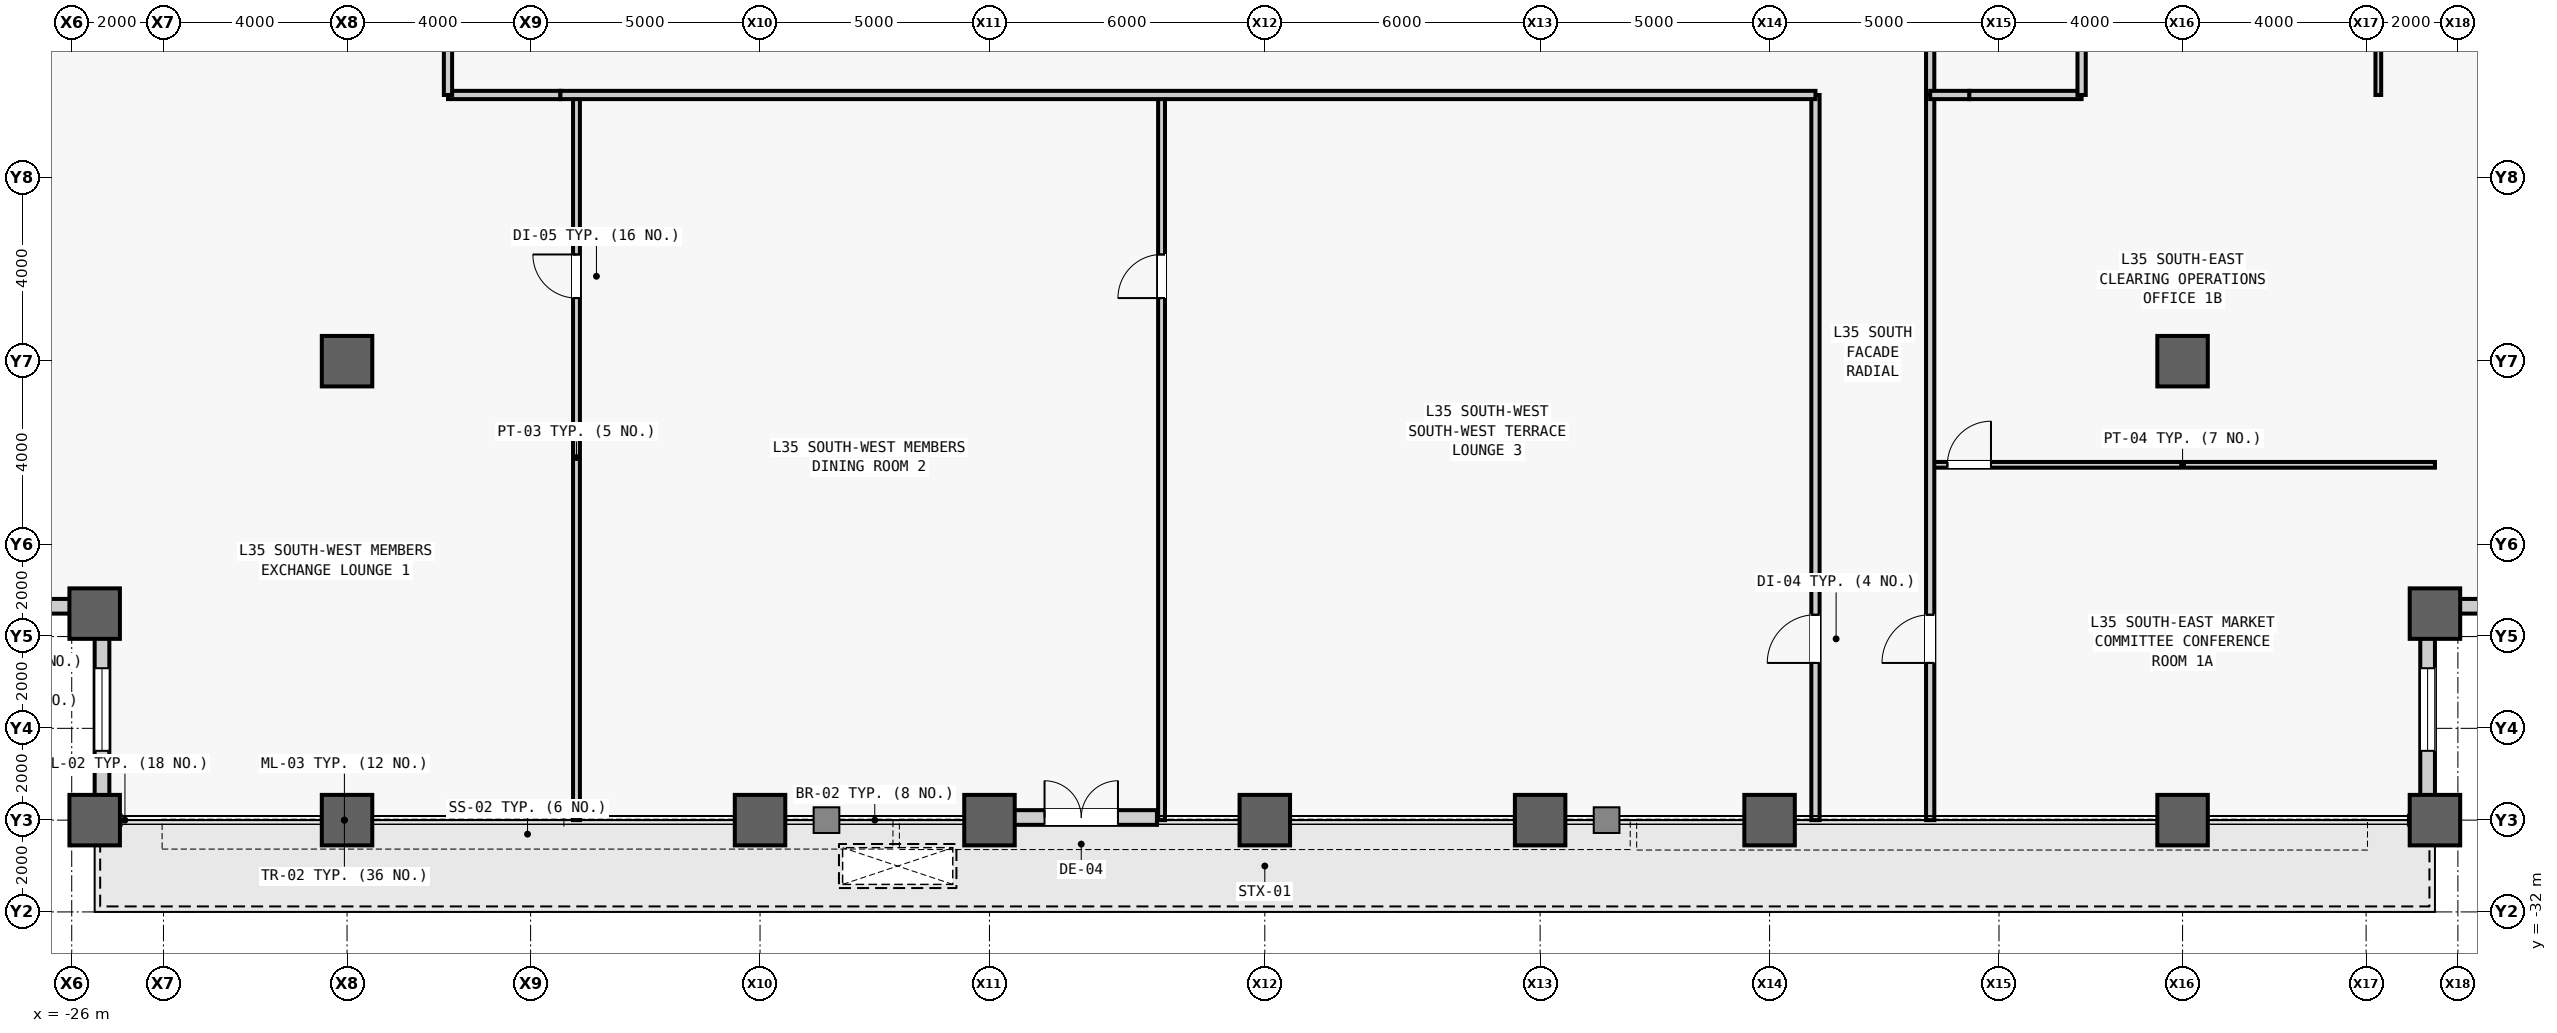
"""IFC4 building model, lengths in metres.
Left out: names, types, materials, properties, quantities, classifications, styles, units other than length and angle.
Written with IfcOpenShell. Run it as: python <this file> out.ifc"""

import sys

from ifc_helpers import new_model, si_unit, direction, frame, frame_2d, origin, origin_2d, place, context, subcontext, project, spatial, rectangle, hollow_rectangle, extrude, source, transform, mapped, element, fill, save


model = new_model("IFC4")
c1 = context("Model", 3, precision=1e-05, world=origin(), true_north=direction((0.0, 1.0)))
c2 = subcontext(c1, "Body", "Model", "MODEL_VIEW")
j1 = project(units=[si_unit("LENGTHUNIT", "METRE"), si_unit("PLANEANGLEUNIT", "RADIAN")], contexts=[c1])
p1 = place(None, origin())
s1 = spatial("IfcSite", under=j1, at=p1, CompositionType="ELEMENT")
p2 = place(p1, origin())
s2 = spatial("IfcBuilding", under=s1, at=p2, CompositionType="ELEMENT")
p3 = place(p2, frame((0.0, 0.0, 155.1)))
s3 = spatial("IfcBuildingStorey", under=s2, at=p3, CompositionType="ELEMENT", Elevation=155.1)
m1 = source(origin(), c2, "Body", "SweptSolid", [
    extrude(hollow_rectangle(XDim=1.1, YDim=1.1, WallThickness=0.06, at=origin_2d()), origin(), (0.0, 0.0, 1.0), 4.0),
])
for number, where, z_axis, x_axis in (
    (1, (-25.5, -30.0, 0.0), (0.0, 0.0, 1.0), (1.0, 0.0, 0.0)),
    (2, (-25.5, -25.5, 0.0), (0.0, 0.0, 1.0), (1.0, 0.0, 0.0)),
    (3, (-20.0, -30.0, 0.0), (0.0, 0.0, 1.0), (1.0, 0.0, 0.0)),
    (4, (-20.0, -20.0, 0.0), (0.0, 0.0, 1.0), (1.0, 0.0, 0.0)),
    (5, (-11.0, -30.0, 0.0), (0.0, 0.0, 1.0), (1.0, 0.0, 0.0)),
    (6, (-6.0, -30.0, 0.0), (0.0, 0.0, 1.0), (1.0, 0.0, 0.0)),
    (7, (0.0, -30.0, 0.0), (0.0, 0.0, 1.0), (1.0, 0.0, 0.0)),
    (8, (6.0, -30.0, 0.0), (0.0, 0.0, 1.0), (1.0, 0.0, 0.0)),
    (9, (11.0, -30.0, 0.0), (0.0, 0.0, 1.0), (1.0, 0.0, 0.0)),
    (10, (20.0, -30.0, 0.0), (0.0, 0.0, 1.0), (1.0, 0.0, 0.0)),
    (11, (20.0, -20.0, 0.0), (0.0, 0.0, 1.0), (1.0, 0.0, 0.0)),
    (12, (25.5, -30.0, 0.0), (0.0, 0.0, 1.0), (1.0, 0.0, 0.0)),
    (13, (25.5, -25.5, 0.0), (0.0, 0.0, 1.0), (1.0, 0.0, 0.0)),
):
    element("IfcColumn", number, at=place(p3, frame(where, z_axis=z_axis, x_axis=x_axis)), inside=s3, PredefinedType="COLUMN", context=c2, shape_type="MappedRepresentation", body=[
        mapped(m1, transform((0.0, 0.0, 0.0), scale=1.0)),
    ])
m2 = source(origin(), c2, "Body", "SweptSolid", [
    extrude(rectangle(XDim=4.18, YDim=0.32, at=frame_2d((2.09, 0.0))), origin(), (0.0, 0.0, 1.0), 3.164),
])
p4 = place(p3, frame((-25.5, -25.34, 0.0), z_axis=(0.0, 0.0, 1.0), x_axis=(-1.0, 0.0, 0.0)))
e14 = element("IfcWall", 14, at=p4, inside=s3, PredefinedType="STANDARD", context=c2, shape_type="MappedRepresentation", body=[
    mapped(m2, transform((0.0, 0.0, 0.0), scale=1.0)),
])
m3 = source(origin(), c2, "Body", "SweptSolid", [
    extrude(rectangle(XDim=1.8, YDim=2.4, at=frame_2d((0.9, 1.2))), frame((0.0, 0.17, 0.0), z_axis=(0.0, -1.0, 0.0), x_axis=(1.0, 0.0, 0.0)), (0.0, 0.0, 1.0), 0.34),
])
p5 = place(p4, frame((1.19, 0.0, 0.5)))
e15 = element("IfcOpeningElement", 15, at=p5, cuts=e14, PredefinedType="OPENING", context=c2, shape_type="MappedRepresentation", body=[
    mapped(m3, transform((0.0, 0.0, 0.0), scale=1.0)),
])
p6 = place(p3, frame((-25.34, -29.68, 0.0), z_axis=(0.0, 0.0, 1.0), x_axis=(0.0, 1.0, 0.0)))
e16 = element("IfcWall", 16, at=p6, inside=s3, PredefinedType="STANDARD", context=c2, shape_type="MappedRepresentation", body=[
    mapped(m2, transform((0.0, 0.0, 0.0), scale=1.0)),
])
p7 = place(p6, frame((1.19, 0.0, 0.5)))
e17 = element("IfcOpeningElement", 17, at=p7, cuts=e16, PredefinedType="OPENING", context=c2, shape_type="MappedRepresentation", body=[
    mapped(m3, transform((0.0, 0.0, 0.0), scale=1.0)),
])
p8 = place(p3, frame((25.34, -29.68, 0.0), z_axis=(0.0, 0.0, 1.0), x_axis=(0.0, 1.0, 0.0)))
e18 = element("IfcWall", 18, at=p8, inside=s3, PredefinedType="STANDARD", context=c2, shape_type="MappedRepresentation", body=[
    mapped(m2, transform((0.0, 0.0, 0.0), scale=1.0)),
])
p9 = place(p8, frame((1.19, 0.0, 0.5)))
e19 = element("IfcOpeningElement", 19, at=p9, cuts=e18, PredefinedType="OPENING", context=c2, shape_type="MappedRepresentation", body=[
    mapped(m3, transform((0.0, 0.0, 0.0), scale=1.0)),
])
p10 = place(p3, frame((25.5, -25.34, 0.0), z_axis=(0.0, 0.0, 1.0), x_axis=(1.0, 0.0, 0.0)))
e20 = element("IfcWall", 20, at=p10, inside=s3, PredefinedType="STANDARD", context=c2, shape_type="MappedRepresentation", body=[
    mapped(m2, transform((0.0, 0.0, 0.0), scale=1.0)),
])
p11 = place(p10, frame((1.19, 0.0, 0.5)))
e21 = element("IfcOpeningElement", 21, at=p11, cuts=e20, PredefinedType="OPENING", context=c2, shape_type="MappedRepresentation", body=[
    mapped(m3, transform((0.0, 0.0, 0.0), scale=1.0)),
])
m4 = source(origin(), c2, "Body", "SweptSolid", [
    extrude(rectangle(XDim=3.3, YDim=0.32, at=frame_2d((1.65, 0.0))), origin(), (0.0, 0.0, 1.0), 3.164),
])
p12 = place(p3, frame((-5.65, -29.942, 0.0), z_axis=(0.0, 0.0, 1.0), x_axis=(1.0, 0.0, 0.0)))
e22 = element("IfcWall", 22, at=p12, inside=s3, PredefinedType="STANDARD", context=c2, shape_type="MappedRepresentation", body=[
    mapped(m4, transform((0.0, 0.0, 0.0), scale=1.0)),
])
m5 = source(origin(), c2, "Body", "SweptSolid", [
    extrude(rectangle(XDim=1.6, YDim=2.25, at=frame_2d((0.8, 1.125))), frame((0.0, 0.17, 0.0), z_axis=(0.0, -1.0, 0.0), x_axis=(1.0, 0.0, 0.0)), (0.0, 0.0, 1.0), 0.34),
])
p13 = place(p12, frame((0.85, 0.0, 0.0)))
e23 = element("IfcOpeningElement", 23, at=p13, cuts=e22, PredefinedType="OPENING", context=c2, shape_type="MappedRepresentation", body=[
    mapped(m5, transform((0.0, 0.0, 0.0), scale=1.0)),
])
m6 = source(origin(), c2, "Body", "SweptSolid", [
    extrude(rectangle(XDim=2.45, YDim=0.18, at=frame_2d((1.225, 0.0))), origin(), (0.0, 0.0, 1.0), 3.78),
])
for number, where, z_axis, x_axis in (
    (24, (15.35, -14.2, 0.0), (0.0, 0.0, 1.0), (1.0, 0.0, 0.0)),
    (25, (-17.8, -14.2, 0.0), (0.0, 0.0, 1.0), (1.0, 0.0, 0.0)),
):
    element("IfcWall", number, at=place(p3, frame(where, z_axis=z_axis, x_axis=x_axis)), inside=s3, PredefinedType="PARTITIONING", context=c2, shape_type="MappedRepresentation", body=[
        mapped(m6, transform((0.0, 0.0, 0.0), scale=1.0)),
    ])
m7 = source(origin(), c2, "Body", "SweptSolid", [
    extrude(rectangle(XDim=3.2, YDim=0.18, at=frame_2d((1.6, 0.0))), origin(), (0.0, 0.0, 1.0), 3.78),
])
p14 = place(p3, frame((14.5, -14.2, 0.0), z_axis=(0.0, 0.0, 1.0), x_axis=(0.0, 1.0, 0.0)))
e26 = element("IfcWall", 26, at=p14, inside=s3, PredefinedType="PARTITIONING", context=c2, shape_type="MappedRepresentation", body=[
    mapped(m7, transform((0.0, 0.0, 0.0), scale=1.0)),
])
m8 = source(origin(), c2, "Body", "SweptSolid", [
    extrude(rectangle(XDim=15.8, YDim=0.15, at=frame_2d((7.9, 0.0))), origin(), (0.0, 0.0, 1.0), 3.78),
])
p15 = place(p3, frame((-15.0, -30.0, 0.0), z_axis=(0.0, 0.0, 1.0), x_axis=(0.0, 1.0, 0.0)))
e27 = element("IfcWall", 27, at=p15, inside=s3, PredefinedType="PARTITIONING", context=c2, shape_type="MappedRepresentation", body=[
    mapped(m8, transform((0.0, 0.0, 0.0), scale=1.0)),
])
m9 = source(origin(), c2, "Body", "SweptSolid", [
    extrude(rectangle(XDim=0.95, YDim=2.15, at=frame_2d((0.475, 1.075))), frame((0.0, 0.085, 0.0), z_axis=(0.0, -1.0, 0.0), x_axis=(1.0, 0.0, 0.0)), (0.0, 0.0, 1.0), 0.17),
])
p16 = place(p15, frame((11.375, 0.0, 0.0)))
e28 = element("IfcOpeningElement", 28, at=p16, cuts=e27, PredefinedType="OPENING", context=c2, shape_type="MappedRepresentation", body=[
    mapped(m9, transform((0.0, 0.0, 0.0), scale=1.0)),
])
p17 = place(p3, frame((-2.25, -30.0, 0.0), z_axis=(0.0, 0.0, 1.0), x_axis=(0.0, 1.0, 0.0)))
e29 = element("IfcWall", 29, at=p17, inside=s3, PredefinedType="PARTITIONING", context=c2, shape_type="MappedRepresentation", body=[
    mapped(m8, transform((0.0, 0.0, 0.0), scale=1.0)),
])
p18 = place(p17, frame((11.375, 0.0, 0.0)))
e30 = element("IfcOpeningElement", 30, at=p18, cuts=e29, PredefinedType="OPENING", context=c2, shape_type="MappedRepresentation", body=[
    mapped(m9, transform((0.0, 0.0, 0.0), scale=1.0)),
])
m10 = source(origin(), c2, "Body", "SweptSolid", [
    extrude(rectangle(XDim=15.8, YDim=0.18, at=frame_2d((7.9, 0.0))), origin(), (0.0, 0.0, 1.0), 3.78),
])
p19 = place(p3, frame((12.0, -30.0, 0.0), z_axis=(0.0, 0.0, 1.0), x_axis=(0.0, 1.0, 0.0)))
e31 = element("IfcWall", 31, at=p19, inside=s3, PredefinedType="PARTITIONING", context=c2, shape_type="MappedRepresentation", body=[
    mapped(m10, transform((0.0, 0.0, 0.0), scale=1.0)),
])
m11 = source(origin(), c2, "Body", "SweptSolid", [
    extrude(rectangle(XDim=1.05, YDim=2.2, at=frame_2d((0.525, 1.1))), frame((0.0, 0.1, 0.0), z_axis=(0.0, -1.0, 0.0), x_axis=(1.0, 0.0, 0.0)), (0.0, 0.0, 1.0), 0.2),
])
p20 = place(p19, frame((3.425, 0.0, 0.0)))
e32 = element("IfcOpeningElement", 32, at=p20, cuts=e31, PredefinedType="OPENING", context=c2, shape_type="MappedRepresentation", body=[
    mapped(m11, transform((0.0, 0.0, 0.0), scale=1.0)),
])
m12 = source(origin(), c2, "Body", "SweptSolid", [
    extrude(rectangle(XDim=27.35, YDim=0.18, at=frame_2d((13.675, 0.0))), origin(), (0.0, 0.0, 1.0), 3.78),
])
p21 = place(p3, frame((-15.35, -14.2, 0.0), z_axis=(0.0, 0.0, 1.0), x_axis=(1.0, 0.0, 0.0)))
e33 = element("IfcWall", 33, at=p21, inside=s3, PredefinedType="PARTITIONING", context=c2, shape_type="MappedRepresentation", body=[
    mapped(m12, transform((0.0, 0.0, 0.0), scale=1.0)),
])
m13 = source(origin(), c2, "Body", "SweptSolid", [
    extrude(rectangle(XDim=11.0, YDim=0.125, at=frame_2d((5.5, 0.0))), origin(), (0.0, 0.0, 1.0), 3.78),
])
p22 = place(p3, frame((14.5, -22.258, 0.0), z_axis=(0.0, 0.0, 1.0), x_axis=(1.0, 0.0, 0.0)))
e34 = element("IfcWall", 34, at=p22, inside=s3, PredefinedType="PARTITIONING", context=c2, shape_type="MappedRepresentation", body=[
    mapped(m13, transform((0.0, 0.0, 0.0), scale=1.0)),
])
m14 = source(origin(), c2, "Body", "SweptSolid", [
    extrude(rectangle(XDim=0.95, YDim=2.15, at=frame_2d((0.475, 1.075))), frame((0.0, 0.073, 0.0), z_axis=(0.0, -1.0, 0.0), x_axis=(1.0, 0.0, 0.0)), (0.0, 0.0, 1.0), 0.145),
])
p23 = place(p22, frame((0.375, 0.0, 0.0)))
e35 = element("IfcOpeningElement", 35, at=p23, cuts=e34, PredefinedType="OPENING", context=c2, shape_type="MappedRepresentation", body=[
    mapped(m14, transform((0.0, 0.0, 0.0), scale=1.0)),
])
p24 = place(p3, frame((14.5, -30.0, 0.0), z_axis=(0.0, 0.0, 1.0), x_axis=(0.0, 1.0, 0.0)))
e36 = element("IfcWall", 36, at=p24, inside=s3, PredefinedType="PARTITIONING", context=c2, shape_type="MappedRepresentation", body=[
    mapped(m10, transform((0.0, 0.0, 0.0), scale=1.0)),
])
p25 = place(p24, frame((3.425, 0.0, 0.0)))
e37 = element("IfcOpeningElement", 37, at=p25, cuts=e36, PredefinedType="OPENING", context=c2, shape_type="MappedRepresentation", body=[
    mapped(m11, transform((0.0, 0.0, 0.0), scale=1.0)),
])
m15 = source(origin(), c2, "Body", "SweptSolid", [
    extrude(rectangle(XDim=0.85, YDim=0.18, at=frame_2d((0.425, 0.0))), origin(), (0.0, 0.0, 1.0), 3.78),
])
p26 = place(p3, frame((14.5, -14.2, 0.0), z_axis=(0.0, 0.0, 1.0), x_axis=(1.0, 0.0, 0.0)))
e38 = element("IfcWall", 38, at=p26, inside=s3, PredefinedType="PARTITIONING", context=c2, shape_type="MappedRepresentation", body=[
    mapped(m15, transform((0.0, 0.0, 0.0), scale=1.0)),
])
m16 = source(origin(), c2, "Body", "SweptSolid", [
    extrude(rectangle(XDim=19.55, YDim=0.18, at=frame_2d((9.775, 0.0))), origin(), (0.0, 0.0, 1.0), 3.78),
])
p27 = place(p3, frame((-17.8, -14.2, 0.0), z_axis=(0.0, 0.0, 1.0), x_axis=(0.0, 1.0, 0.0)))
e39 = element("IfcWall", 39, at=p27, inside=s3, PredefinedType="PARTITIONING", context=c2, shape_type="MappedRepresentation", body=[
    mapped(m16, transform((0.0, 0.0, 0.0), scale=1.0)),
])
m17 = source(origin(), c2, "Body", "SweptSolid", [
    extrude(rectangle(XDim=8.45, YDim=0.125, at=frame_2d((4.225, 0.0))), origin(), (0.0, 0.0, 1.0), 3.78),
])
p28 = place(p3, frame((24.266, -14.2, 0.0), z_axis=(0.0, 0.0, 1.0), x_axis=(0.0, 1.0, 0.0)))
e40 = element("IfcWall", 40, at=p28, inside=s3, PredefinedType="PARTITIONING", context=c2, shape_type="MappedRepresentation", body=[
    mapped(m17, transform((0.0, 0.0, 0.0), scale=1.0)),
])
m18 = source(origin(), c2, "Body", "SweptSolid", [
    extrude(rectangle(XDim=8.45, YDim=0.18, at=frame_2d((4.225, 0.0))), origin(), (0.0, 0.0, 1.0), 3.78),
])
p29 = place(p3, frame((17.8, -14.2, 0.0), z_axis=(0.0, 0.0, 1.0), x_axis=(0.0, 1.0, 0.0)))
e41 = element("IfcWall", 41, at=p29, inside=s3, PredefinedType="PARTITIONING", context=c2, shape_type="MappedRepresentation", body=[
    mapped(m18, transform((0.0, 0.0, 0.0), scale=1.0)),
])
m19 = source(origin(), c2, "Body", "SweptSolid", [
    extrude(rectangle(XDim=1.8, YDim=2.4, at=frame_2d((0.9, 1.2))), frame((0.0, 0.03, 0.0), z_axis=(0.0, -1.0, 0.0), x_axis=(1.0, 0.0, 0.0)), (0.0, 0.0, 1.0), 0.06),
])
p30 = place(p7, origin())
e42 = element("IfcWindow", 42, at=p30, inside=s3, PartitioningType="SINGLE_PANEL", PredefinedType="WINDOW", context=c2, shape_type="MappedRepresentation", body=[
    mapped(m19, transform((0.0, 0.0, 0.0), scale=1.0)),
])
fill(e17, e42)
p31 = place(p9, origin())
e43 = element("IfcWindow", 43, at=p31, inside=s3, PartitioningType="SINGLE_PANEL", PredefinedType="WINDOW", context=c2, shape_type="MappedRepresentation", body=[
    mapped(m19, transform((0.0, 0.0, 0.0), scale=1.0)),
])
fill(e19, e43)
m20 = source(origin(), c2, "Body", "SweptSolid", [
    extrude(rectangle(XDim=1.6, YDim=2.25, at=frame_2d((0.8, 1.125))), frame((0.0, 0.025, 0.0), z_axis=(0.0, -1.0, 0.0), x_axis=(1.0, 0.0, 0.0)), (0.0, 0.0, 1.0), 0.05),
])
p32 = place(p13, origin())
e44 = element("IfcDoor", 44, at=p32, inside=s3, OperationType="DOUBLE_DOOR_SINGLE_SWING", PredefinedType="DOOR", context=c2, shape_type="MappedRepresentation", body=[
    mapped(m20, transform((0.0, 0.0, 0.0), scale=1.0)),
])
fill(e23, e44)
m21 = source(origin(), c2, "Body", "SweptSolid", [
    extrude(rectangle(XDim=0.95, YDim=2.15, at=frame_2d((0.475, 1.075))), frame((0.0, 0.025, 0.0), z_axis=(0.0, -1.0, 0.0), x_axis=(1.0, 0.0, 0.0)), (0.0, 0.0, 1.0), 0.05),
])
p33 = place(p16, origin())
e45 = element("IfcDoor", 45, at=p33, inside=s3, OperationType="SINGLE_SWING_RIGHT", PredefinedType="DOOR", context=c2, shape_type="MappedRepresentation", body=[
    mapped(m21, transform((0.0, 0.0, 0.0), scale=1.0)),
])
fill(e28, e45)
p34 = place(p18, origin())
e46 = element("IfcDoor", 46, at=p34, inside=s3, OperationType="SINGLE_SWING_LEFT", PredefinedType="DOOR", context=c2, shape_type="MappedRepresentation", body=[
    mapped(m21, transform((0.0, 0.0, 0.0), scale=1.0)),
])
fill(e30, e46)
m22 = source(origin(), c2, "Body", "SweptSolid", [
    extrude(rectangle(XDim=1.05, YDim=2.2, at=frame_2d((0.525, 1.1))), frame((0.0, 0.025, 0.0), z_axis=(0.0, -1.0, 0.0), x_axis=(1.0, 0.0, 0.0)), (0.0, 0.0, 1.0), 0.05),
])
p35 = place(p20, origin())
e47 = element("IfcDoor", 47, at=p35, inside=s3, OperationType="SINGLE_SWING_LEFT", PredefinedType="DOOR", context=c2, shape_type="MappedRepresentation", body=[
    mapped(m22, transform((0.0, 0.0, 0.0), scale=1.0)),
])
fill(e32, e47)
p36 = place(p23, origin())
e48 = element("IfcDoor", 48, at=p36, inside=s3, OperationType="SINGLE_SWING_RIGHT", PredefinedType="DOOR", context=c2, shape_type="MappedRepresentation", body=[
    mapped(m21, transform((0.0, 0.0, 0.0), scale=1.0)),
])
fill(e35, e48)
p37 = place(p25, origin())
e49 = element("IfcDoor", 49, at=p37, inside=s3, OperationType="SINGLE_SWING_LEFT", PredefinedType="DOOR", context=c2, shape_type="MappedRepresentation", body=[
    mapped(m22, transform((0.0, 0.0, 0.0), scale=1.0)),
])
fill(e37, e49)
save(model, sys.argv[1])
